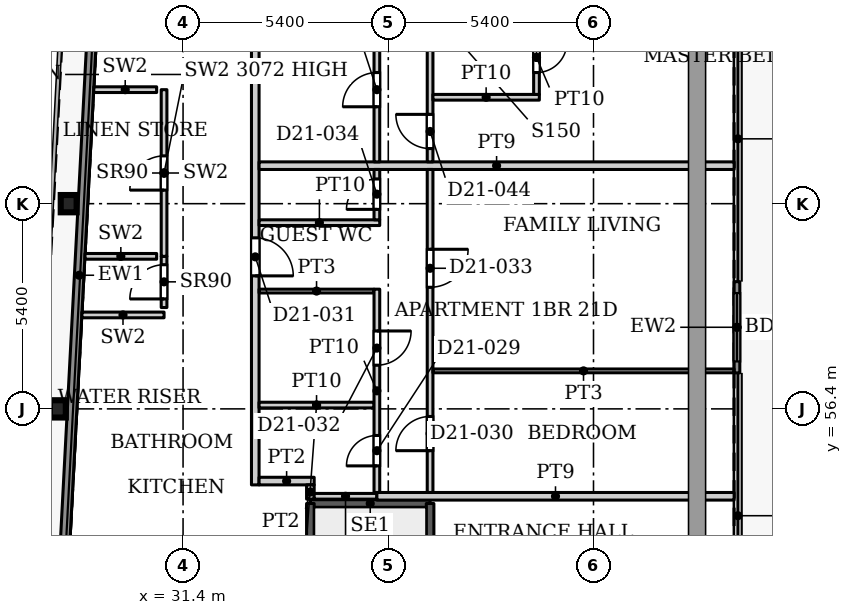
"""IFC4 building model, lengths in metres.
Left out: names, types, materials, properties, quantities, classifications, styles, units other than length and angle.
Written with IfcOpenShell. Run it as: python <this file> out.ifc"""

import sys

from ifc_helpers import new_model, si_unit, direction, frame, frame_2d, origin, origin_2d, place, context, subcontext, project, spatial, rectangle, i_section, extrude, source, transform, mapped, element, fill, save


model = new_model("IFC4")
c1 = context("Model", 3, precision=1e-05, world=origin(), true_north=direction((0.0, 1.0)))
c2 = subcontext(c1, "Body", "Model", "MODEL_VIEW")
j1 = project(units=[si_unit("LENGTHUNIT", "METRE"), si_unit("PLANEANGLEUNIT", "RADIAN")], contexts=[c1])
p1 = place(None, origin())
s1 = spatial("IfcSite", under=j1, at=p1, CompositionType="ELEMENT")
p2 = place(p1, origin())
s2 = spatial("IfcBuilding", under=s1, at=p2, CompositionType="ELEMENT")
p3 = place(p2, frame((0.0, 0.0, 94.1)))
s3 = spatial("IfcBuildingStorey", under=s2, at=p3, CompositionType="ELEMENT", Elevation=94.1)
for number, where, z_axis, x_axis in (
    (1, (28.106, 56.4, 0.0), (0.0, 0.0, 1.0), (1.0, 0.0, 0.0)),
    (2, (28.39, 61.8, 0.0), (0.0, 0.0, 1.0), (1.0, 0.0, 0.0)),
):
    element("IfcColumn", number, at=place(p3, frame(where, z_axis=z_axis, x_axis=x_axis)), inside=s3, PredefinedType="COLUMN", context=c2, shape_type="SweptSolid", body=[
        extrude(i_section(OverallWidth=0.418, OverallDepth=0.455, WebThickness=0.042, FlangeThickness=0.068, FilletRadius=0.014, at=origin_2d()), origin(), (0.0, 0.0, 1.0), 3.9),
    ])
p4 = place(p3, frame((45.975, 59.748, 0.0), z_axis=(0.0, 0.0, 1.0), x_axis=(0.0, -1.0, 0.0)))
e3 = element("IfcWall", 3, at=p4, inside=s3, PredefinedType="SOLIDWALL", context=c2, shape_type="SweptSolid", body=[
    extrude(rectangle(XDim=2.401, YDim=0.15, at=frame_2d((1.201, 0.0))), origin(), (0.0, 0.0, 1.0), 3.75),
])
p5 = place(p4, frame((0.3, 0.0, 0.0)))
e4 = element("IfcOpeningElement", 4, at=p5, cuts=e3, PredefinedType="OPENING", context=c2, shape_type="SweptSolid", body=[
    extrude(rectangle(XDim=1.8, YDim=2.4, at=frame_2d((0.9, 1.2))), frame((0.0, 0.085, 0.0), z_axis=(0.0, -1.0, 0.0), x_axis=(1.0, 0.0, 0.0)), (0.0, 0.0, 1.0), 0.17),
])
p6 = place(p3, frame((27.195, 31.969, 0.0), z_axis=(0.0, 0.0, 1.0), x_axis=(0.052559748861, 0.998617781135, 0.0)))
e5 = element("IfcWall", 5, at=p6, inside=s3, PredefinedType="SOLIDWALL", context=c2, shape_type="SweptSolid", body=[
    extrude(rectangle(XDim=55.972, YDim=0.25, at=frame_2d((27.986, 0.0))), origin(), (0.0, 0.0, 1.0), 3.75),
])
p7 = place(p3, frame((34.75, 53.91, 0.0), z_axis=(0.0, 0.0, 1.0), x_axis=(1.0, 0.0, 0.0)))
e6 = element("IfcWall", 6, at=p7, inside=s3, PredefinedType="SHEAR", context=c2, shape_type="SweptSolid", body=[
    extrude(rectangle(XDim=3.15, YDim=0.2, at=frame_2d((1.575, 0.0))), origin(), (0.0, 0.0, 1.0), 3.9),
])
p8 = place(p3, frame((34.75, 47.5, 0.0), z_axis=(0.0, 0.0, 1.0), x_axis=(0.0, 1.0, 0.0)))
e7 = element("IfcWall", 7, at=p8, inside=s3, PredefinedType="SHEAR", context=c2, shape_type="SweptSolid", body=[
    extrude(rectangle(XDim=6.41, YDim=0.2, at=frame_2d((3.205, 0.0))), origin(), (0.0, 0.0, 1.0), 3.9),
])
p9 = place(p3, frame((37.9, 44.75, 0.0), z_axis=(0.0, 0.0, 1.0), x_axis=(0.0, 1.0, 0.0)))
e8 = element("IfcWall", 8, at=p9, inside=s3, PredefinedType="SHEAR", context=c2, shape_type="SweptSolid", body=[
    extrude(rectangle(XDim=9.16, YDim=0.2, at=frame_2d((4.58, 0.0))), origin(), (0.0, 0.0, 1.0), 3.9),
])
p10 = place(p3, frame((28.739, 58.872, 0.0), z_axis=(0.0, 0.0, 1.0), x_axis=(1.0, 0.0, 0.0)))
e9 = element("IfcWall", 9, at=p10, inside=s3, PredefinedType="PARTITIONING", context=c2, shape_type="SweptSolid", body=[
    extrude(rectangle(XDim=2.161, YDim=0.15, at=frame_2d((1.081, 0.0))), origin(), (0.0, 0.0, 1.0), 3.9),
])
p11 = place(p3, frame((30.9, 59.067, 0.0), z_axis=(0.0, 0.0, 1.0), x_axis=(0.0, 1.0, 0.0)))
e10 = element("IfcWall", 10, at=p11, inside=s3, PredefinedType="PARTITIONING", context=c2, shape_type="SweptSolid", body=[
    extrude(rectangle(XDim=1.347, YDim=0.15, at=frame_2d((0.674, 0.0))), origin(), (0.0, 0.0, 1.0), 3.9),
])
p12 = place(p11, frame((0.226, 0.0, 0.0)))
e11 = element("IfcOpeningElement", 11, at=p12, cuts=e10, PredefinedType="OPENING", context=c2, shape_type="SweptSolid", body=[
    extrude(rectangle(XDim=0.9, YDim=2.2, at=frame_2d((0.45, 1.1))), frame((0.0, 0.085, 0.0), z_axis=(0.0, -1.0, 0.0), x_axis=(1.0, 0.0, 0.0)), (0.0, 0.0, 1.0), 0.17),
])
p13 = place(p3, frame((28.82, 60.414, 0.0), z_axis=(0.0, 0.0, 1.0), x_axis=(1.0, 0.0, 0.0)))
e12 = element("IfcWall", 12, at=p13, inside=s3, PredefinedType="PARTITIONING", context=c2, shape_type="SweptSolid", body=[
    extrude(rectangle(XDim=1.885, YDim=0.15, at=frame_2d((0.942, 0.0))), origin(), (0.0, 0.0, 1.0), 3.9),
])
p14 = place(p3, frame((30.9, 60.414, 0.0), z_axis=(0.0, 0.0, 1.0), x_axis=(0.0, 1.0, 0.0)))
e13 = element("IfcWall", 13, at=p14, inside=s3, PredefinedType="PARTITIONING", context=c2, shape_type="SweptSolid", body=[
    extrude(rectangle(XDim=4.386, YDim=0.15, at=frame_2d((2.193, 0.0))), origin(), (0.0, 0.0, 1.0), 3.072),
])
p15 = place(p14, frame((1.743, 0.0, 0.0)))
e14 = element("IfcOpeningElement", 14, at=p15, cuts=e13, PredefinedType="OPENING", context=c2, shape_type="SweptSolid", body=[
    extrude(rectangle(XDim=0.9, YDim=2.2, at=frame_2d((0.45, 1.1))), frame((0.0, 0.085, 0.0), z_axis=(0.0, -1.0, 0.0), x_axis=(1.0, 0.0, 0.0)), (0.0, 0.0, 1.0), 0.17),
])
p16 = place(p3, frame((29.051, 64.8, 0.0), z_axis=(0.0, 0.0, 1.0), x_axis=(1.0, 0.0, 0.0)))
e15 = element("IfcWall", 15, at=p16, inside=s3, PredefinedType="PARTITIONING", context=c2, shape_type="SweptSolid", body=[
    extrude(rectangle(XDim=1.654, YDim=0.15, at=frame_2d((0.827, 0.0))), origin(), (0.0, 0.0, 1.0), 3.9),
])
p17 = place(p3, frame((33.3, 54.4, 0.0), z_axis=(0.0, 0.0, 1.0), x_axis=(0.0, 1.0, 0.0)))
e16 = element("IfcWall", 16, at=p17, inside=s3, PredefinedType="PARTITIONING", context=c2, shape_type="SweptSolid", body=[
    extrude(rectangle(XDim=24.95, YDim=0.2, at=frame_2d((12.475, 0.0))), origin(), (0.0, 0.0, 1.0), 3.6),
])
p18 = place(p17, frame((5.5, 0.0, 0.0)))
e17 = element("IfcOpeningElement", 17, at=p18, cuts=e16, PredefinedType="OPENING", context=c2, shape_type="SweptSolid", body=[
    extrude(rectangle(XDim=1.0, YDim=2.1, at=frame_2d((0.5, 1.05))), frame((0.0, 0.11, 0.0), z_axis=(0.0, -1.0, 0.0), x_axis=(1.0, 0.0, 0.0)), (0.0, 0.0, 1.0), 0.22),
])
p19 = place(p17, frame((22.3, 0.0, 0.0)))
e18 = element("IfcOpeningElement", 18, at=p19, cuts=e16, PredefinedType="OPENING", context=c2, shape_type="SweptSolid", body=[
    extrude(rectangle(XDim=1.0, YDim=2.1, at=frame_2d((0.5, 1.05))), frame((0.0, 0.11, 0.0), z_axis=(0.0, -1.0, 0.0), x_axis=(1.0, 0.0, 0.0)), (0.0, 0.0, 1.0), 0.22),
])
p20 = place(p3, frame((33.4, 54.5, 0.0), z_axis=(0.0, 0.0, 1.0), x_axis=(1.0, 0.0, 0.0)))
e19 = element("IfcWall", 19, at=p20, inside=s3, PredefinedType="PARTITIONING", context=c2, shape_type="SweptSolid", body=[
    extrude(rectangle(XDim=1.45, YDim=0.2, at=frame_2d((0.725, 0.0))), origin(), (0.0, 0.0, 1.0), 3.6),
])
p21 = place(p3, frame((33.4, 56.5, 0.0), z_axis=(0.0, 0.0, 1.0), x_axis=(1.0, 0.0, 0.0)))
e20 = element("IfcWall", 20, at=p21, inside=s3, PredefinedType="PARTITIONING", context=c2, shape_type="SweptSolid", body=[
    extrude(rectangle(XDim=3.025, YDim=0.15, at=frame_2d((1.513, 0.0))), origin(), (0.0, 0.0, 1.0), 3.072),
])
p22 = place(p3, frame((33.4, 59.5, 0.0), z_axis=(0.0, 0.0, 1.0), x_axis=(1.0, 0.0, 0.0)))
e21 = element("IfcWall", 21, at=p22, inside=s3, PredefinedType="PARTITIONING", context=c2, shape_type="SweptSolid", body=[
    extrude(rectangle(XDim=3.025, YDim=0.1, at=frame_2d((1.513, 0.0))), origin(), (0.0, 0.0, 1.0), 3.6),
])
p23 = place(p3, frame((33.4, 61.3, 0.0), z_axis=(0.0, 0.0, 1.0), x_axis=(1.0, 0.0, 0.0)))
e22 = element("IfcWall", 22, at=p23, inside=s3, PredefinedType="PARTITIONING", context=c2, shape_type="SweptSolid", body=[
    extrude(rectangle(XDim=3.175, YDim=0.15, at=frame_2d((1.587, 0.0))), origin(), (0.0, 0.0, 1.0), 3.6),
])
p24 = place(p3, frame((33.4, 62.8, 0.0), z_axis=(0.0, 0.0, 1.0), x_axis=(1.0, 0.0, 0.0)))
e23 = element("IfcWall", 23, at=p24, inside=s3, PredefinedType="PARTITIONING", context=c2, shape_type="SweptSolid", body=[
    extrude(rectangle(XDim=12.5, YDim=0.2, at=frame_2d((6.25, 0.0))), origin(), (0.0, 0.0, 1.0), 3.6),
])
p25 = place(p3, frame((34.75, 54.025, 0.0), z_axis=(0.0, 0.0, 1.0), x_axis=(0.0, 1.0, 0.0)))
e24 = element("IfcWall", 24, at=p25, inside=s3, PredefinedType="PARTITIONING", context=c2, shape_type="SweptSolid", body=[
    extrude(rectangle(XDim=0.375, YDim=0.2, at=frame_2d((0.188, 0.0))), origin(), (0.0, 0.0, 1.0), 3.6),
])
p26 = place(p3, frame((34.85, 54.1, 0.0), z_axis=(0.0, 0.0, 1.0), x_axis=(1.0, 0.0, 0.0)))
e25 = element("IfcWall", 25, at=p26, inside=s3, PredefinedType="PARTITIONING", context=c2, shape_type="SweptSolid", body=[
    extrude(rectangle(XDim=1.65, YDim=0.15, at=frame_2d((0.825, 0.0))), origin(), (0.0, 0.0, 1.0), 3.6),
])
p27 = place(p3, frame((36.5, 54.1, 0.0), z_axis=(0.0, 0.0, 1.0), x_axis=(1.0, 0.0, 0.0)))
e26 = element("IfcWall", 26, at=p27, inside=s3, PredefinedType="PARTITIONING", context=c2, shape_type="SweptSolid", body=[
    extrude(rectangle(XDim=9.4, YDim=0.2, at=frame_2d((4.7, 0.0))), origin(), (0.0, 0.0, 1.0), 3.6),
])
p28 = place(p3, frame((36.5, 54.2, 0.0), z_axis=(0.0, 0.0, 1.0), x_axis=(0.0, 1.0, 0.0)))
e27 = element("IfcWall", 27, at=p28, inside=s3, PredefinedType="PARTITIONING", context=c2, shape_type="SweptSolid", body=[
    extrude(rectangle(XDim=5.35, YDim=0.15, at=frame_2d((2.675, 0.0))), origin(), (0.0, 0.0, 1.0), 3.6),
])
p29 = place(p28, frame((0.7, 0.0, 0.0)))
e28 = element("IfcOpeningElement", 28, at=p29, cuts=e27, PredefinedType="OPENING", context=c2, shape_type="SweptSolid", body=[
    extrude(rectangle(XDim=0.8, YDim=2.1, at=frame_2d((0.4, 1.05))), frame((0.0, 0.085, 0.0), z_axis=(0.0, -1.0, 0.0), x_axis=(1.0, 0.0, 0.0)), (0.0, 0.0, 1.0), 0.17),
])
p30 = place(p28, frame((3.35, 0.0, 0.0)))
e29 = element("IfcOpeningElement", 29, at=p30, cuts=e27, PredefinedType="OPENING", context=c2, shape_type="SweptSolid", body=[
    extrude(rectangle(XDim=0.9, YDim=2.1, at=frame_2d((0.45, 1.05))), frame((0.0, 0.085, 0.0), z_axis=(0.0, -1.0, 0.0), x_axis=(1.0, 0.0, 0.0)), (0.0, 0.0, 1.0), 0.17),
])
p31 = place(p3, frame((36.5, 61.375, 0.0), z_axis=(0.0, 0.0, 1.0), x_axis=(0.0, 1.0, 0.0)))
e30 = element("IfcWall", 30, at=p31, inside=s3, PredefinedType="PARTITIONING", context=c2, shape_type="SweptSolid", body=[
    extrude(rectangle(XDim=1.325, YDim=0.15, at=frame_2d((0.663, 0.0))), origin(), (0.0, 0.0, 1.0), 3.6),
])
p32 = place(p31, frame((0.275, 0.0, 0.0)))
e31 = element("IfcOpeningElement", 31, at=p32, cuts=e30, PredefinedType="OPENING", context=c2, shape_type="SweptSolid", body=[
    extrude(rectangle(XDim=0.8, YDim=2.1, at=frame_2d((0.4, 1.05))), frame((0.0, 0.085, 0.0), z_axis=(0.0, -1.0, 0.0), x_axis=(1.0, 0.0, 0.0)), (0.0, 0.0, 1.0), 0.17),
])
p33 = place(p3, frame((36.5, 62.9, 0.0), z_axis=(0.0, 0.0, 1.0), x_axis=(0.0, 1.0, 0.0)))
e32 = element("IfcWall", 32, at=p33, inside=s3, PredefinedType="PARTITIONING", context=c2, shape_type="SweptSolid", body=[
    extrude(rectangle(XDim=13.175, YDim=0.15, at=frame_2d((6.587, 0.0))), origin(), (0.0, 0.0, 1.0), 3.6),
])
p34 = place(p33, frame((5.8, 0.0, 0.0)))
e33 = element("IfcOpeningElement", 33, at=p34, cuts=e32, PredefinedType="OPENING", context=c2, shape_type="SweptSolid", body=[
    extrude(rectangle(XDim=0.8, YDim=2.1, at=frame_2d((0.4, 1.05))), frame((0.0, 0.085, 0.0), z_axis=(0.0, -1.0, 0.0), x_axis=(1.0, 0.0, 0.0)), (0.0, 0.0, 1.0), 0.17),
])
p35 = place(p33, frame((11.2, 0.0, 0.0)))
e34 = element("IfcOpeningElement", 34, at=p35, cuts=e32, PredefinedType="OPENING", context=c2, shape_type="SweptSolid", body=[
    extrude(rectangle(XDim=0.8, YDim=2.1, at=frame_2d((0.4, 1.05))), frame((0.0, 0.085, 0.0), z_axis=(0.0, -1.0, 0.0), x_axis=(1.0, 0.0, 0.0)), (0.0, 0.0, 1.0), 0.17),
])
p36 = place(p33, frame((1.45, 0.0, 0.0)))
e35 = element("IfcOpeningElement", 35, at=p36, cuts=e32, PredefinedType="OPENING", context=c2, shape_type="SweptSolid", body=[
    extrude(rectangle(XDim=0.9, YDim=2.1, at=frame_2d((0.45, 1.05))), frame((0.0, 0.085, 0.0), z_axis=(0.0, -1.0, 0.0), x_axis=(1.0, 0.0, 0.0)), (0.0, 0.0, 1.0), 0.17),
])
p37 = place(p33, frame((8.5, 0.0, 0.0)))
e36 = element("IfcOpeningElement", 36, at=p37, cuts=e32, PredefinedType="OPENING", context=c2, shape_type="SweptSolid", body=[
    extrude(rectangle(XDim=0.8, YDim=2.1, at=frame_2d((0.4, 1.05))), frame((0.0, 0.085, 0.0), z_axis=(0.0, -1.0, 0.0), x_axis=(1.0, 0.0, 0.0)), (0.0, 0.0, 1.0), 0.17),
])
p38 = place(p3, frame((37.9, 54.2, 0.0), z_axis=(0.0, 0.0, 1.0), x_axis=(0.0, 1.0, 0.0)))
e37 = element("IfcWall", 37, at=p38, inside=s3, PredefinedType="PARTITIONING", context=c2, shape_type="SweptSolid", body=[
    extrude(rectangle(XDim=8.5, YDim=0.15, at=frame_2d((4.25, 0.0))), origin(), (0.0, 0.0, 1.0), 3.6),
])
p39 = place(p38, frame((1.1, 0.0, 0.0)))
e38 = element("IfcOpeningElement", 38, at=p39, cuts=e37, PredefinedType="OPENING", context=c2, shape_type="SweptSolid", body=[
    extrude(rectangle(XDim=0.9, YDim=2.1, at=frame_2d((0.45, 1.05))), frame((0.0, 0.085, 0.0), z_axis=(0.0, -1.0, 0.0), x_axis=(1.0, 0.0, 0.0)), (0.0, 0.0, 1.0), 0.17),
])
p40 = place(p38, frame((5.4, 0.0, 0.0)))
e39 = element("IfcOpeningElement", 39, at=p40, cuts=e37, PredefinedType="OPENING", context=c2, shape_type="SweptSolid", body=[
    extrude(rectangle(XDim=1.0, YDim=2.1, at=frame_2d((0.5, 1.05))), frame((0.0, 0.085, 0.0), z_axis=(0.0, -1.0, 0.0), x_axis=(1.0, 0.0, 0.0)), (0.0, 0.0, 1.0), 0.17),
])
p41 = place(p3, frame((37.9, 62.9, 0.0), z_axis=(0.0, 0.0, 1.0), x_axis=(0.0, 1.0, 0.0)))
e40 = element("IfcWall", 40, at=p41, inside=s3, PredefinedType="PARTITIONING", context=c2, shape_type="SweptSolid", body=[
    extrude(rectangle(XDim=16.35, YDim=0.15, at=frame_2d((8.175, 0.0))), origin(), (0.0, 0.0, 1.0), 3.6),
])
p42 = place(p41, frame((4.85, 0.0, 0.0)))
e41 = element("IfcOpeningElement", 41, at=p42, cuts=e40, PredefinedType="OPENING", context=c2, shape_type="SweptSolid", body=[
    extrude(rectangle(XDim=0.9, YDim=2.1, at=frame_2d((0.45, 1.05))), frame((0.0, 0.085, 0.0), z_axis=(0.0, -1.0, 0.0), x_axis=(1.0, 0.0, 0.0)), (0.0, 0.0, 1.0), 0.17),
])
p43 = place(p41, frame((8.0, 0.0, 0.0)))
e42 = element("IfcOpeningElement", 42, at=p43, cuts=e40, PredefinedType="OPENING", context=c2, shape_type="SweptSolid", body=[
    extrude(rectangle(XDim=0.9, YDim=2.1, at=frame_2d((0.45, 1.05))), frame((0.0, 0.085, 0.0), z_axis=(0.0, -1.0, 0.0), x_axis=(1.0, 0.0, 0.0)), (0.0, 0.0, 1.0), 0.17),
])
p44 = place(p41, frame((14.25, 0.0, 0.0)))
e43 = element("IfcOpeningElement", 43, at=p44, cuts=e40, PredefinedType="OPENING", context=c2, shape_type="SweptSolid", body=[
    extrude(rectangle(XDim=1.0, YDim=2.1, at=frame_2d((0.5, 1.05))), frame((0.0, 0.085, 0.0), z_axis=(0.0, -1.0, 0.0), x_axis=(1.0, 0.0, 0.0)), (0.0, 0.0, 1.0), 0.17),
])
p45 = place(p41, frame((10.8, 0.0, 0.0)))
e44 = element("IfcOpeningElement", 44, at=p45, cuts=e40, PredefinedType="OPENING", context=c2, shape_type="SweptSolid", body=[
    extrude(rectangle(XDim=1.6, YDim=2.1, at=frame_2d((0.8, 1.05))), frame((0.0, 0.085, 0.0), z_axis=(0.0, -1.0, 0.0), x_axis=(1.0, 0.0, 0.0)), (0.0, 0.0, 1.0), 0.17),
])
p46 = place(p41, frame((0.35, 0.0, 0.0)))
e45 = element("IfcOpeningElement", 45, at=p46, cuts=e40, PredefinedType="OPENING", context=c2, shape_type="SweptSolid", body=[
    extrude(rectangle(XDim=0.9, YDim=2.1, at=frame_2d((0.45, 1.05))), frame((0.0, 0.085, 0.0), z_axis=(0.0, -1.0, 0.0), x_axis=(1.0, 0.0, 0.0)), (0.0, 0.0, 1.0), 0.17),
])
p47 = place(p3, frame((37.975, 57.4, 0.0), z_axis=(0.0, 0.0, 1.0), x_axis=(1.0, 0.0, 0.0)))
e46 = element("IfcWall", 46, at=p47, inside=s3, PredefinedType="PARTITIONING", context=c2, shape_type="SweptSolid", body=[
    extrude(rectangle(XDim=7.925, YDim=0.1, at=frame_2d((3.962, 0.0))), origin(), (0.0, 0.0, 1.0), 3.6),
])
p48 = place(p3, frame((37.975, 64.6, 0.0), z_axis=(0.0, 0.0, 1.0), x_axis=(1.0, 0.0, 0.0)))
e47 = element("IfcWall", 47, at=p48, inside=s3, PredefinedType="PARTITIONING", context=c2, shape_type="SweptSolid", body=[
    extrude(rectangle(XDim=2.8, YDim=0.15, at=frame_2d((1.4, 0.0))), origin(), (0.0, 0.0, 1.0), 3.6),
])
p49 = place(p3, frame((40.7, 64.675, 0.0), z_axis=(0.0, 0.0, 1.0), x_axis=(0.0, 1.0, 0.0)))
e48 = element("IfcWall", 48, at=p49, inside=s3, PredefinedType="PARTITIONING", context=c2, shape_type="SweptSolid", body=[
    extrude(rectangle(XDim=1.95, YDim=0.15, at=frame_2d((0.975, 0.0))), origin(), (0.0, 0.0, 1.0), 3.6),
])
p50 = place(p49, frame((0.575, 0.0, 0.0)))
e49 = element("IfcOpeningElement", 49, at=p50, cuts=e48, PredefinedType="OPENING", context=c2, shape_type="SweptSolid", body=[
    extrude(rectangle(XDim=0.8, YDim=2.1, at=frame_2d((0.4, 1.05))), frame((0.0, 0.085, 0.0), z_axis=(0.0, -1.0, 0.0), x_axis=(1.0, 0.0, 0.0)), (0.0, 0.0, 1.0), 0.17),
])
m1 = source(origin(), c2, "Body", "SweptSolid", [
    extrude(rectangle(XDim=1.8, YDim=2.4, at=frame_2d((0.9, 1.2))), frame((0.0, 0.025, 0.0), z_axis=(0.0, -1.0, 0.0), x_axis=(1.0, 0.0, 0.0)), (0.0, 0.0, 1.0), 0.05),
])
p51 = place(p5, origin())
e50 = element("IfcDoor", 50, at=p51, inside=s3, OperationType="SLIDING_TO_LEFT", PredefinedType="DOOR", context=c2, shape_type="MappedRepresentation", body=[
    mapped(m1, transform((0.0, 0.0, 0.0), x_axis=(1.0, 0.0, 0.0), y_axis=(0.0, 1.0, 0.0), z_axis=(0.0, 0.0, 1.0), scale=1.0)),
])
fill(e4, e50)
m2 = source(origin(), c2, "Body", "SweptSolid", [
    extrude(rectangle(XDim=0.9, YDim=2.2, at=frame_2d((0.45, 1.1))), frame((0.0, 0.025, 0.0), z_axis=(0.0, -1.0, 0.0), x_axis=(1.0, 0.0, 0.0)), (0.0, 0.0, 1.0), 0.05),
])
p52 = place(p12, origin())
e51 = element("IfcDoor", 51, at=p52, inside=s3, OperationType="SINGLE_SWING_LEFT", PredefinedType="DOOR", context=c2, shape_type="MappedRepresentation", body=[
    mapped(m2, transform((0.0, 0.0, 0.0), x_axis=(1.0, 0.0, 0.0), y_axis=(0.0, 1.0, 0.0), z_axis=(0.0, 0.0, 1.0), scale=1.0)),
])
fill(e11, e51)
p53 = place(p15, origin())
e52 = element("IfcDoor", 52, at=p53, inside=s3, OperationType="SINGLE_SWING_LEFT", PredefinedType="DOOR", context=c2, shape_type="MappedRepresentation", body=[
    mapped(m2, transform((0.0, 0.0, 0.0), x_axis=(1.0, 0.0, 0.0), y_axis=(0.0, 1.0, 0.0), z_axis=(0.0, 0.0, 1.0), scale=1.0)),
])
fill(e14, e52)
m3 = source(origin(), c2, "Body", "SweptSolid", [
    extrude(rectangle(XDim=0.8, YDim=2.1, at=frame_2d((0.4, 1.05))), frame((0.0, 0.025, 0.0), z_axis=(0.0, -1.0, 0.0), x_axis=(1.0, 0.0, 0.0)), (0.0, 0.0, 1.0), 0.05),
])
p54 = place(p29, origin())
e53 = element("IfcDoor", 53, at=p54, inside=s3, OperationType="SINGLE_SWING_LEFT", PredefinedType="DOOR", context=c2, shape_type="MappedRepresentation", body=[
    mapped(m3, transform((0.0, 0.0, 0.0), x_axis=(1.0, 0.0, 0.0), y_axis=(0.0, 1.0, 0.0), z_axis=(0.0, 0.0, 1.0), scale=1.0)),
])
fill(e28, e53)
m4 = source(origin(), c2, "Body", "SweptSolid", [
    extrude(rectangle(XDim=0.9, YDim=2.1, at=frame_2d((0.45, 1.05))), frame((0.0, 0.025, 0.0), z_axis=(0.0, -1.0, 0.0), x_axis=(1.0, 0.0, 0.0)), (0.0, 0.0, 1.0), 0.05),
])
p55 = place(p39, origin())
e54 = element("IfcDoor", 54, at=p55, inside=s3, OperationType="SINGLE_SWING_LEFT", PredefinedType="DOOR", context=c2, shape_type="MappedRepresentation", body=[
    mapped(m4, transform((0.0, 0.0, 0.0), x_axis=(1.0, 0.0, 0.0), y_axis=(0.0, 1.0, 0.0), z_axis=(0.0, 0.0, 1.0), scale=1.0)),
])
fill(e38, e54)
m5 = source(origin(), c2, "Body", "SweptSolid", [
    extrude(rectangle(XDim=1.0, YDim=2.1, at=frame_2d((0.5, 1.05))), frame((0.0, 0.025, 0.0), z_axis=(0.0, -1.0, 0.0), x_axis=(1.0, 0.0, 0.0)), (0.0, 0.0, 1.0), 0.05),
])
p56 = place(p18, origin())
e55 = element("IfcDoor", 55, at=p56, inside=s3, OperationType="SINGLE_SWING_RIGHT", PredefinedType="DOOR", context=c2, shape_type="MappedRepresentation", body=[
    mapped(m5, transform((0.0, 0.0, 0.0), x_axis=(1.0, 0.0, 0.0), y_axis=(0.0, 1.0, 0.0), z_axis=(0.0, 0.0, 1.0), scale=1.0)),
])
fill(e17, e55)
p57 = place(p30, origin())
e56 = element("IfcDoor", 56, at=p57, inside=s3, OperationType="SINGLE_SWING_RIGHT", PredefinedType="DOOR", context=c2, shape_type="MappedRepresentation", body=[
    mapped(m4, transform((0.0, 0.0, 0.0), x_axis=(1.0, 0.0, 0.0), y_axis=(0.0, 1.0, 0.0), z_axis=(0.0, 0.0, 1.0), scale=1.0)),
])
fill(e29, e56)
m6 = source(origin(), c2, "Body", "SweptSolid", [
    extrude(rectangle(XDim=1.0, YDim=2.1, at=frame_2d((0.5, 1.05))), frame((0.0, 0.025, 0.0), z_axis=(0.0, -1.0, 0.0), x_axis=(1.0, 0.0, 0.0)), (0.0, 0.0, 1.0), 0.05),
])
p58 = place(p40, origin())
e57 = element("IfcDoor", 57, at=p58, inside=s3, OperationType="SINGLE_SWING_RIGHT", PredefinedType="DOOR", context=c2, shape_type="MappedRepresentation", body=[
    mapped(m6, transform((0.0, 0.0, 0.0), x_axis=(1.0, 0.0, 0.0), y_axis=(0.0, 1.0, 0.0), z_axis=(0.0, 0.0, 1.0), scale=1.0)),
])
fill(e39, e57)
p59 = place(p32, origin())
e58 = element("IfcDoor", 58, at=p59, inside=s3, OperationType="SINGLE_SWING_LEFT", PredefinedType="DOOR", context=c2, shape_type="MappedRepresentation", body=[
    mapped(m3, transform((0.0, 0.0, 0.0), x_axis=(1.0, 0.0, 0.0), y_axis=(0.0, 1.0, 0.0), z_axis=(0.0, 0.0, 1.0), scale=1.0)),
])
fill(e31, e58)
p60 = place(p50, origin())
e59 = element("IfcDoor", 59, at=p60, inside=s3, OperationType="SINGLE_SWING_RIGHT", PredefinedType="DOOR", context=c2, shape_type="MappedRepresentation", body=[
    mapped(m3, transform((0.0, 0.0, 0.0), x_axis=(1.0, 0.0, 0.0), y_axis=(0.0, 1.0, 0.0), z_axis=(0.0, 0.0, 1.0), scale=1.0)),
])
fill(e49, e59)
p61 = place(p36, origin())
e60 = element("IfcDoor", 60, at=p61, inside=s3, OperationType="SINGLE_SWING_LEFT", PredefinedType="DOOR", context=c2, shape_type="MappedRepresentation", body=[
    mapped(m4, transform((0.0, 0.0, 0.0), x_axis=(1.0, 0.0, 0.0), y_axis=(0.0, 1.0, 0.0), z_axis=(0.0, 0.0, 1.0), scale=1.0)),
])
fill(e35, e60)
p62 = place(p46, origin())
e61 = element("IfcDoor", 61, at=p62, inside=s3, OperationType="SINGLE_SWING_LEFT", PredefinedType="DOOR", context=c2, shape_type="MappedRepresentation", body=[
    mapped(m4, transform((0.0, 0.0, 0.0), x_axis=(1.0, 0.0, 0.0), y_axis=(0.0, 1.0, 0.0), z_axis=(0.0, 0.0, 1.0), scale=1.0)),
])
fill(e45, e61)
save(model, sys.argv[1])
